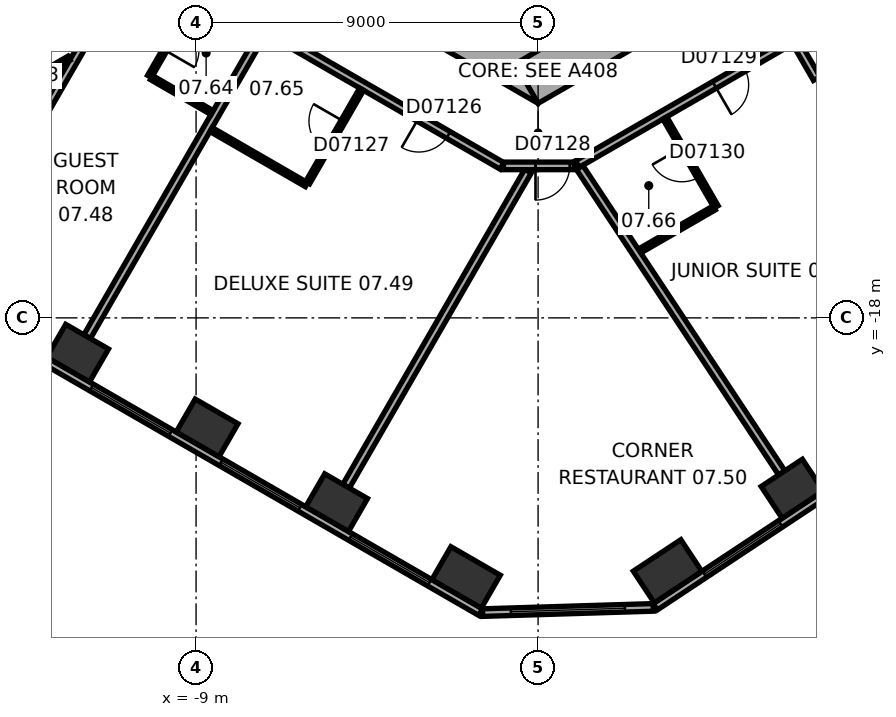
"""IFC4 building model, lengths in metres.
Left out: names, types, materials, properties, quantities, classifications, styles, units other than length and angle.
Written with IfcOpenShell. Run it as: python <this file> out.ifc"""

import sys

from ifc_helpers import new_model, si_unit, direction, frame, frame_2d, origin, origin_2d, place, context, subcontext, project, spatial, rectangle, extrude, element, fill, save


model = new_model("IFC4")
c1 = context("Model", 3, precision=1e-05, world=origin(), true_north=direction((0.0, 1.0)))
c2 = subcontext(c1, "Body", "Model", "MODEL_VIEW")
j1 = project(units=[si_unit("LENGTHUNIT", "METRE"), si_unit("PLANEANGLEUNIT", "RADIAN")], contexts=[c1])
p1 = place(None, origin())
s1 = spatial("IfcSite", under=j1, at=p1, CompositionType="ELEMENT")
p2 = place(p1, origin())
s2 = spatial("IfcBuilding", under=s1, at=p2, CompositionType="ELEMENT")
p3 = place(p2, frame((0.0, 0.0, 44.0)))
s3 = spatial("IfcBuildingStorey", under=s2, at=p3, CompositionType="ELEMENT", Elevation=44.0)
for number, where, z_axis, x_axis in (
    (1, (-12.117, -18.927, 0.0), (0.0, 0.0, 1.0), (0.866, -0.5, 0.0)),
    (2, (-8.71, -20.895, 0.0), (0.0, 0.0, 1.0), (0.866, -0.5, 0.0)),
    (3, (-5.302, -22.862, 0.0), (0.0, 0.0, 1.0), (0.866, -0.5, 0.0)),
):
    element("IfcColumn", number, at=place(p3, frame(where, z_axis=z_axis, x_axis=x_axis)), inside=s3, PredefinedType="COLUMN", context=c2, shape_type="SweptSolid", body=[
        extrude(rectangle(XDim=1.3, YDim=1.0, at=origin_2d()), origin(), (0.0, 0.0, 1.0), 3.3),
    ])
for number, where, z_axis, x_axis in (
    (4, (-1.895, -24.829, 0.0), (0.0, 0.0, 1.0), (0.866, -0.5, 0.0)),
    (5, (3.407, -24.667, 0.0), (0.0, 0.0, 1.0), (0.834, 0.552, 0.0)),
):
    element("IfcColumn", number, at=place(p3, frame(where, z_axis=z_axis, x_axis=x_axis)), inside=s3, PredefinedType="COLUMN", context=c2, shape_type="SweptSolid", body=[
        extrude(rectangle(XDim=1.5, YDim=1.0, at=origin_2d()), origin(), (0.0, 0.0, 1.0), 3.3),
    ])
p4 = place(p3, frame((6.688, -22.496, 0.0), z_axis=(0.0, 0.0, 1.0), x_axis=(0.833885822067, 0.551936985312, 0.0)))
e6 = element("IfcColumn", 6, at=p4, inside=s3, PredefinedType="COLUMN", context=c2, shape_type="SweptSolid", body=[
    extrude(rectangle(XDim=1.3, YDim=1.0, at=origin_2d()), origin(), (0.0, 0.0, 1.0), 3.3),
])
p5 = place(p3, frame((-10.4, -5.658, 0.0), z_axis=(0.0, 0.0, 1.0), x_axis=(0.866021384402, -0.500006961711, 0.0)))
e7 = element("IfcWall", 7, at=p5, inside=s3, PredefinedType="SHEAR", context=c2, shape_type="SweptSolid", body=[
    extrude(rectangle(XDim=12.355, YDim=1.2, at=frame_2d((6.178, 0.0))), origin(), (0.0, 0.0, 1.0), 3.3),
])
p6 = place(p5, frame((6.378, 0.0, 0.0)))
e8 = element("IfcOpeningElement", 8, at=p6, cuts=e7, PredefinedType="OPENING", context=c2, shape_type="SweptSolid", body=[
    extrude(rectangle(XDim=1.5, YDim=2.1, at=frame_2d((0.75, 1.05))), frame((0.0, 0.61, 0.0), z_axis=(0.0, -1.0, 0.0), x_axis=(1.0, 0.0, 0.0)), (0.0, 0.0, 1.0), 1.22),
])
p7 = place(p5, frame((3.228, 0.0, 0.0)))
e9 = element("IfcOpeningElement", 9, at=p7, cuts=e7, PredefinedType="OPENING", context=c2, shape_type="SweptSolid", body=[
    extrude(rectangle(XDim=0.9, YDim=2.1, at=frame_2d((0.45, 1.05))), frame((0.0, 0.61, 0.0), z_axis=(0.0, -1.0, 0.0), x_axis=(1.0, 0.0, 0.0)), (0.0, 0.0, 1.0), 1.22),
])
p8 = place(p3, frame((-0.3, -11.836, 0.0), z_axis=(0.0, 0.0, 1.0), x_axis=(0.866021384402, 0.500006961711, 0.0)))
e10 = element("IfcWall", 10, at=p8, inside=s3, PredefinedType="SHEAR", context=c2, shape_type="SweptSolid", body=[
    extrude(rectangle(XDim=12.355, YDim=1.2, at=frame_2d((6.178, 0.0))), origin(), (0.0, 0.0, 1.0), 3.3),
])
p9 = place(p8, frame((2.828, 0.0, 0.0)))
e11 = element("IfcOpeningElement", 11, at=p9, cuts=e10, PredefinedType="OPENING", context=c2, shape_type="SweptSolid", body=[
    extrude(rectangle(XDim=0.9, YDim=2.1, at=frame_2d((0.45, 1.05))), frame((0.0, 0.61, 0.0), z_axis=(0.0, -1.0, 0.0), x_axis=(1.0, 0.0, 0.0)), (0.0, 0.0, 1.0), 1.22),
])
p10 = place(p8, frame((5.428, 0.0, 0.0)))
e12 = element("IfcOpeningElement", 12, at=p10, cuts=e10, PredefinedType="OPENING", context=c2, shape_type="SweptSolid", body=[
    extrude(rectangle(XDim=0.9, YDim=2.1, at=frame_2d((0.45, 1.05))), frame((0.0, 0.61, 0.0), z_axis=(0.0, -1.0, 0.0), x_axis=(1.0, 0.0, 0.0)), (0.0, 0.0, 1.0), 1.22),
])
p11 = place(p8, frame((7.928, 0.0, 0.0)))
e13 = element("IfcOpeningElement", 13, at=p11, cuts=e10, PredefinedType="OPENING", context=c2, shape_type="SweptSolid", body=[
    extrude(rectangle(XDim=1.1, YDim=2.1, at=frame_2d((0.55, 1.05))), frame((0.0, 0.61, 0.0), z_axis=(0.0, -1.0, 0.0), x_axis=(1.0, 0.0, 0.0)), (0.0, 0.0, 1.0), 1.22),
])
p12 = place(p3, frame((-19.914, -15.119, 0.0), z_axis=(0.0, 0.0, 1.0), x_axis=(0.866025418898, -0.499999973822, 0.0)))
e14 = element("IfcWall", 14, at=p12, inside=s3, PredefinedType="STANDARD", context=c2, shape_type="SweptSolid", body=[
    extrude(rectangle(XDim=21.246, YDim=0.2, at=frame_2d((10.623, 0.0))), origin(), (0.0, 0.0, 1.0), 3.3),
])
p13 = place(p12, frame((1.555, 0.0, 0.8)))
e15 = element("IfcOpeningElement", 15, at=p13, cuts=e14, PredefinedType="OPENING", context=c2, shape_type="SweptSolid", body=[
    extrude(rectangle(XDim=2.4, YDim=1.7, at=frame_2d((1.2, 0.85))), frame((0.0, 0.11, 0.0), z_axis=(0.0, -1.0, 0.0), x_axis=(1.0, 0.0, 0.0)), (0.0, 0.0, 1.0), 0.22),
])
p14 = place(p12, frame((5.489, 0.0, 0.8)))
e16 = element("IfcOpeningElement", 16, at=p14, cuts=e14, PredefinedType="OPENING", context=c2, shape_type="SweptSolid", body=[
    extrude(rectangle(XDim=2.4, YDim=1.7, at=frame_2d((1.2, 0.85))), frame((0.0, 0.11, 0.0), z_axis=(0.0, -1.0, 0.0), x_axis=(1.0, 0.0, 0.0)), (0.0, 0.0, 1.0), 0.22),
])
p15 = place(p12, frame((9.424, 0.0, 0.8)))
e17 = element("IfcOpeningElement", 17, at=p15, cuts=e14, PredefinedType="OPENING", context=c2, shape_type="SweptSolid", body=[
    extrude(rectangle(XDim=2.4, YDim=1.7, at=frame_2d((1.2, 0.85))), frame((0.0, 0.11, 0.0), z_axis=(0.0, -1.0, 0.0), x_axis=(1.0, 0.0, 0.0)), (0.0, 0.0, 1.0), 0.22),
])
p16 = place(p12, frame((13.358, 0.0, 0.8)))
e18 = element("IfcOpeningElement", 18, at=p16, cuts=e14, PredefinedType="OPENING", context=c2, shape_type="SweptSolid", body=[
    extrude(rectangle(XDim=2.4, YDim=1.7, at=frame_2d((1.2, 0.85))), frame((0.0, 0.11, 0.0), z_axis=(0.0, -1.0, 0.0), x_axis=(1.0, 0.0, 0.0)), (0.0, 0.0, 1.0), 0.22),
])
p17 = place(p12, frame((17.293, 0.0, 0.8)))
e19 = element("IfcOpeningElement", 19, at=p17, cuts=e14, PredefinedType="OPENING", context=c2, shape_type="SweptSolid", body=[
    extrude(rectangle(XDim=2.4, YDim=1.7, at=frame_2d((1.2, 0.85))), frame((0.0, 0.11, 0.0), z_axis=(0.0, -1.0, 0.0), x_axis=(1.0, 0.0, 0.0)), (0.0, 0.0, 1.0), 0.22),
])
p18 = place(p3, frame((-1.461, -25.755, 0.0), z_axis=(0.0, 0.0, 1.0), x_axis=(0.999533823446, 0.030530898895, 0.0)))
e20 = element("IfcWall", 20, at=p18, inside=s3, PredefinedType="STANDARD", context=c2, shape_type="SweptSolid", body=[
    extrude(rectangle(XDim=4.494, YDim=0.2, at=frame_2d((2.247, 0.0))), origin(), (0.0, 0.0, 1.0), 3.3),
])
p19 = place(p18, frame((0.747, 0.0, 0.8)))
e21 = element("IfcOpeningElement", 21, at=p19, cuts=e20, PredefinedType="OPENING", context=c2, shape_type="SweptSolid", body=[
    extrude(rectangle(XDim=3.0, YDim=1.7, at=frame_2d((1.5, 0.85))), frame((0.0, 0.11, 0.0), z_axis=(0.0, -1.0, 0.0), x_axis=(1.0, 0.0, 0.0)), (0.0, 0.0, 1.0), 0.22),
])
p20 = place(p3, frame((3.083, -25.601, 0.0), z_axis=(0.0, 0.0, 1.0), x_axis=(0.833884295743, 0.551939291329, 0.0)))
e22 = element("IfcWall", 22, at=p20, inside=s3, PredefinedType="STANDARD", context=c2, shape_type="SweptSolid", body=[
    extrude(rectangle(XDim=21.246, YDim=0.2, at=frame_2d((10.623, 0.0))), origin(), (0.0, 0.0, 1.0), 3.3),
])
p21 = place(p20, frame((1.553, 0.0, 0.8)))
e23 = element("IfcOpeningElement", 23, at=p21, cuts=e22, PredefinedType="OPENING", context=c2, shape_type="SweptSolid", body=[
    extrude(rectangle(XDim=2.4, YDim=1.7, at=frame_2d((1.2, 0.85))), frame((0.0, 0.11, 0.0), z_axis=(0.0, -1.0, 0.0), x_axis=(1.0, 0.0, 0.0)), (0.0, 0.0, 1.0), 0.22),
])
p22 = place(p20, frame((5.488, 0.0, 0.8)))
e24 = element("IfcOpeningElement", 24, at=p22, cuts=e22, PredefinedType="OPENING", context=c2, shape_type="SweptSolid", body=[
    extrude(rectangle(XDim=2.4, YDim=1.7, at=frame_2d((1.2, 0.85))), frame((0.0, 0.11, 0.0), z_axis=(0.0, -1.0, 0.0), x_axis=(1.0, 0.0, 0.0)), (0.0, 0.0, 1.0), 0.22),
])
p23 = place(p20, frame((9.422, 0.0, 0.8)))
e25 = element("IfcOpeningElement", 25, at=p23, cuts=e22, PredefinedType="OPENING", context=c2, shape_type="SweptSolid", body=[
    extrude(rectangle(XDim=2.4, YDim=1.7, at=frame_2d((1.2, 0.85))), frame((0.0, 0.11, 0.0), z_axis=(0.0, -1.0, 0.0), x_axis=(1.0, 0.0, 0.0)), (0.0, 0.0, 1.0), 0.22),
])
p24 = place(p20, frame((13.357, 0.0, 0.8)))
e26 = element("IfcOpeningElement", 26, at=p24, cuts=e22, PredefinedType="OPENING", context=c2, shape_type="SweptSolid", body=[
    extrude(rectangle(XDim=2.4, YDim=1.7, at=frame_2d((1.2, 0.85))), frame((0.0, 0.11, 0.0), z_axis=(0.0, -1.0, 0.0), x_axis=(1.0, 0.0, 0.0)), (0.0, 0.0, 1.0), 0.22),
])
p25 = place(p20, frame((17.291, 0.0, 0.8)))
e27 = element("IfcOpeningElement", 27, at=p25, cuts=e22, PredefinedType="OPENING", context=c2, shape_type="SweptSolid", body=[
    extrude(rectangle(XDim=2.4, YDim=1.7, at=frame_2d((1.2, 0.85))), frame((0.0, 0.11, 0.0), z_axis=(0.0, -1.0, 0.0), x_axis=(1.0, 0.0, 0.0)), (0.0, 0.0, 1.0), 0.22),
])
p26 = place(p3, frame((-15.274, -16.527, 0.0), z_axis=(0.0, 0.0, 1.0), x_axis=(0.49998823431, 0.866032196602, 0.0)))
e28 = element("IfcWall", 28, at=p26, inside=s3, PredefinedType="PARTITIONING", context=c2, shape_type="SweptSolid", body=[
    extrude(rectangle(XDim=9.25, YDim=0.2, at=frame_2d((4.625, 0.0))), origin(), (0.0, 0.0, 1.0), 3.05),
])
p27 = place(p3, frame((-12.342, -11.167, 0.0), z_axis=(0.0, 0.0, 1.0), x_axis=(-0.865992557167, -0.500056887695, 0.0)))
e29 = element("IfcWall", 29, at=p27, inside=s3, PredefinedType="PARTITIONING", context=c2, shape_type="SweptSolid", body=[
    extrude(rectangle(XDim=1.769, YDim=0.12, at=frame_2d((0.885, 0.0))), origin(), (0.0, 0.0, 1.0), 3.05),
])
p28 = place(p3, frame((-11.867, -18.494, 0.0), z_axis=(0.0, 0.0, 1.0), x_axis=(0.499999662836, 0.866025598446, 0.0)))
e30 = element("IfcWall", 30, at=p28, inside=s3, PredefinedType="PARTITIONING", context=c2, shape_type="SweptSolid", body=[
    extrude(rectangle(XDim=9.25, YDim=0.2, at=frame_2d((4.625, 0.0))), origin(), (0.0, 0.0, 1.0), 2.6),
])
p29 = place(p3, frame((-11.615, -7.843, 0.0), z_axis=(0.0, 0.0, 1.0), x_axis=(0.866026466995, -0.499998158461, 0.0)))
e31 = element("IfcWall", 31, at=p29, inside=s3, PredefinedType="PARTITIONING", context=c2, shape_type="SweptSolid", body=[
    extrude(rectangle(XDim=12.315, YDim=0.2, at=frame_2d((6.158, 0.0))), origin(), (0.0, 0.0, 1.0), 3.05),
])
p30 = place(p29, frame((1.665, 0.0, 0.0)))
e32 = element("IfcOpeningElement", 32, at=p30, cuts=e31, PredefinedType="OPENING", context=c2, shape_type="SweptSolid", body=[
    extrude(rectangle(XDim=0.9, YDim=2.1, at=frame_2d((0.45, 1.05))), frame((0.0, 0.11, 0.0), z_axis=(0.0, -1.0, 0.0), x_axis=(1.0, 0.0, 0.0)), (0.0, 0.0, 1.0), 0.22),
])
p31 = place(p29, frame((9.787, 0.0, 0.0)))
e33 = element("IfcOpeningElement", 33, at=p31, cuts=e31, PredefinedType="OPENING", context=c2, shape_type="SweptSolid", body=[
    extrude(rectangle(XDim=0.9, YDim=2.1, at=frame_2d((0.45, 1.05))), frame((0.0, 0.11, 0.0), z_axis=(0.0, -1.0, 0.0), x_axis=(1.0, 0.0, 0.0)), (0.0, 0.0, 1.0), 0.22),
])
p32 = place(p3, frame((-10.224, -11.648, 0.0), z_axis=(0.0, 0.0, 1.0), x_axis=(0.500004234368, 0.866022959057, 0.0)))
e34 = element("IfcWall", 34, at=p32, inside=s3, PredefinedType="PARTITIONING", context=c2, shape_type="SweptSolid", body=[
    extrude(rectangle(XDim=2.5, YDim=0.12, at=frame_2d((1.25, 0.0))), origin(), (0.0, 0.0, 1.0), 3.05),
])
p33 = place(p32, frame((0.8, 0.0, 0.0)))
e35 = element("IfcOpeningElement", 35, at=p33, cuts=e34, PredefinedType="OPENING", context=c2, shape_type="SweptSolid", body=[
    extrude(rectangle(XDim=0.9, YDim=2.1, at=frame_2d((0.45, 1.05))), frame((0.0, 0.07, 0.0), z_axis=(0.0, -1.0, 0.0), x_axis=(1.0, 0.0, 0.0)), (0.0, 0.0, 1.0), 0.14),
])
p34 = place(p3, frame((-8.579, -12.598, 0.0), z_axis=(0.0, 0.0, 1.0), x_axis=(-0.866046386007, 0.499963655964, 0.0)))
e36 = element("IfcWall", 36, at=p34, inside=s3, PredefinedType="PARTITIONING", context=c2, shape_type="SweptSolid", body=[
    extrude(rectangle(XDim=1.84, YDim=0.12, at=frame_2d((0.92, 0.0))), origin(), (0.0, 0.0, 1.0), 3.05),
])
p35 = place(p3, frame((-6.094, -14.495, 0.0), z_axis=(0.0, 0.0, 1.0), x_axis=(-0.866032775405, 0.499987231761, 0.0)))
e37 = element("IfcWall", 37, at=p35, inside=s3, PredefinedType="PARTITIONING", context=c2, shape_type="SweptSolid", body=[
    extrude(rectangle(XDim=2.9, YDim=0.12, at=frame_2d((1.45, 0.0))), origin(), (0.0, 0.0, 1.0), 3.05),
])
p36 = place(p3, frame((-5.052, -22.429, 0.0), z_axis=(0.0, 0.0, 1.0), x_axis=(0.500004329283, 0.866022904257, 0.0)))
e38 = element("IfcWall", 38, at=p36, inside=s3, PredefinedType="PARTITIONING", context=c2, shape_type="SweptSolid", body=[
    extrude(rectangle(XDim=9.572, YDim=0.2, at=frame_2d((4.786, 0.0))), origin(), (0.0, 0.0, 1.0), 3.05),
])
p37 = place(p3, frame((-4.644, -11.983, 0.0), z_axis=(0.0, 0.0, 1.0), x_axis=(-0.499985389037, -0.866033839264, 0.0)))
e39 = element("IfcWall", 39, at=p37, inside=s3, PredefinedType="PARTITIONING", context=c2, shape_type="SweptSolid", body=[
    extrude(rectangle(XDim=2.84, YDim=0.12, at=frame_2d((1.42, 0.0))), origin(), (0.0, 0.0, 1.0), 3.05),
])
p38 = place(p37, frame((0.97, 0.0, 0.0)))
e40 = element("IfcOpeningElement", 40, at=p38, cuts=e39, PredefinedType="OPENING", context=c2, shape_type="SweptSolid", body=[
    extrude(rectangle(XDim=0.9, YDim=2.1, at=frame_2d((0.45, 1.05))), frame((0.0, 0.07, 0.0), z_axis=(0.0, -1.0, 0.0), x_axis=(1.0, 0.0, 0.0)), (0.0, 0.0, 1.0), 0.14),
])
p39 = place(p3, frame((-0.91, -14.001, 0.0), z_axis=(0.0, 0.0, 1.0), x_axis=(1.0, 0.0, 0.0)))
e41 = element("IfcWall", 41, at=p39, inside=s3, PredefinedType="PARTITIONING", context=c2, shape_type="SweptSolid", body=[
    extrude(rectangle(XDim=1.86, YDim=0.2, at=frame_2d((0.93, 0.0))), origin(), (0.0, 0.0, 1.0), 3.05),
])
p40 = place(p39, frame((0.842, 0.0, 0.0)))
e42 = element("IfcOpeningElement", 42, at=p40, cuts=e41, PredefinedType="OPENING", context=c2, shape_type="SweptSolid", body=[
    extrude(rectangle(XDim=0.9, YDim=2.1, at=frame_2d((0.45, 1.05))), frame((0.0, 0.11, 0.0), z_axis=(0.0, -1.0, 0.0), x_axis=(1.0, 0.0, 0.0)), (0.0, 0.0, 1.0), 0.22),
])
p41 = place(p3, frame((1.033, -13.953, 0.0), z_axis=(0.0, 0.0, 1.0), x_axis=(0.866017531406, 0.500013635111, 0.0)))
e43 = element("IfcWall", 43, at=p41, inside=s3, PredefinedType="PARTITIONING", context=c2, shape_type="SweptSolid", body=[
    extrude(rectangle(XDim=6.58, YDim=0.2, at=frame_2d((3.29, 0.0))), origin(), (0.0, 0.0, 1.0), 3.05),
])
p42 = place(p41, frame((4.165, 0.0, 0.0)))
e44 = element("IfcOpeningElement", 44, at=p42, cuts=e43, PredefinedType="OPENING", context=c2, shape_type="SweptSolid", body=[
    extrude(rectangle(XDim=0.9, YDim=2.1, at=frame_2d((0.45, 1.05))), frame((0.0, 0.11, 0.0), z_axis=(0.0, -1.0, 0.0), x_axis=(1.0, 0.0, 0.0)), (0.0, 0.0, 1.0), 0.22),
])
p43 = place(p3, frame((3.335, -12.739, 0.0), z_axis=(0.0, 0.0, 1.0), x_axis=(0.499980770555, -0.866036505625, 0.0)))
e45 = element("IfcWall", 45, at=p43, inside=s3, PredefinedType="PARTITIONING", context=c2, shape_type="SweptSolid", body=[
    extrude(rectangle(XDim=2.7, YDim=0.12, at=frame_2d((1.35, 0.0))), origin(), (0.0, 0.0, 1.0), 3.05),
])
p44 = place(p43, frame((0.9, 0.0, 0.0)))
e46 = element("IfcOpeningElement", 46, at=p44, cuts=e45, PredefinedType="OPENING", context=c2, shape_type="SweptSolid", body=[
    extrude(rectangle(XDim=0.9, YDim=2.1, at=frame_2d((0.45, 1.05))), frame((0.0, 0.07, 0.0), z_axis=(0.0, -1.0, 0.0), x_axis=(1.0, 0.0, 0.0)), (0.0, 0.0, 1.0), 0.14),
])
p45 = place(p3, frame((4.633, -15.107, 0.0), z_axis=(0.0, 0.0, 1.0), x_axis=(-0.866022496617, -0.500005035328, 0.0)))
e47 = element("IfcWall", 47, at=p45, inside=s3, PredefinedType="PARTITIONING", context=c2, shape_type="SweptSolid", body=[
    extrude(rectangle(XDim=2.269, YDim=0.12, at=frame_2d((1.134, 0.0))), origin(), (0.0, 0.0, 1.0), 3.05),
])
p46 = place(p3, frame((6.412, -22.079, 0.0), z_axis=(0.0, 0.0, 1.0), x_axis=(-0.551919507115, 0.83389739037, 0.0)))
e48 = element("IfcWall", 48, at=p46, inside=s3, PredefinedType="PARTITIONING", context=c2, shape_type="SweptSolid", body=[
    extrude(rectangle(XDim=9.635, YDim=0.2, at=frame_2d((4.817, 0.0))), origin(), (0.0, 0.0, 1.0), 3.05),
])
p47 = place(p3, frame((6.782, -10.749, 0.0), z_axis=(0.0, 0.0, 1.0), x_axis=(0.500074377092, -0.865982457891, 0.0)))
e49 = element("IfcWall", 49, at=p47, inside=s3, PredefinedType="PARTITIONING", context=c2, shape_type="SweptSolid", body=[
    extrude(rectangle(XDim=1.101, YDim=0.2, at=frame_2d((0.55, 0.0))), origin(), (0.0, 0.0, 1.0), 3.05),
])
p48 = place(p15, origin())
e50 = element("IfcWindow", 50, at=p48, inside=s3, PartitioningType="SINGLE_PANEL", PredefinedType="WINDOW", context=c2, shape_type="SweptSolid", body=[
    extrude(rectangle(XDim=2.4, YDim=1.7, at=frame_2d((1.2, 0.85))), frame((0.0, 0.03, 0.0), z_axis=(0.0, -1.0, 0.0), x_axis=(1.0, 0.0, 0.0)), (0.0, 0.0, 1.0), 0.06),
])
fill(e17, e50)
p49 = place(p16, origin())
e51 = element("IfcWindow", 51, at=p49, inside=s3, PartitioningType="SINGLE_PANEL", PredefinedType="WINDOW", context=c2, shape_type="SweptSolid", body=[
    extrude(rectangle(XDim=2.4, YDim=1.7, at=frame_2d((1.2, 0.85))), frame((0.0, 0.03, 0.0), z_axis=(0.0, -1.0, 0.0), x_axis=(1.0, 0.0, 0.0)), (0.0, 0.0, 1.0), 0.06),
])
fill(e18, e51)
p50 = place(p17, origin())
e52 = element("IfcWindow", 52, at=p50, inside=s3, PartitioningType="SINGLE_PANEL", PredefinedType="WINDOW", context=c2, shape_type="SweptSolid", body=[
    extrude(rectangle(XDim=2.4, YDim=1.7, at=frame_2d((1.2, 0.85))), frame((0.0, 0.03, 0.0), z_axis=(0.0, -1.0, 0.0), x_axis=(1.0, 0.0, 0.0)), (0.0, 0.0, 1.0), 0.06),
])
fill(e19, e52)
p51 = place(p19, origin())
e53 = element("IfcWindow", 53, at=p51, inside=s3, PartitioningType="SINGLE_PANEL", PredefinedType="WINDOW", context=c2, shape_type="SweptSolid", body=[
    extrude(rectangle(XDim=3.0, YDim=1.7, at=frame_2d((1.5, 0.85))), frame((0.0, 0.03, 0.0), z_axis=(0.0, -1.0, 0.0), x_axis=(1.0, 0.0, 0.0)), (0.0, 0.0, 1.0), 0.06),
])
fill(e21, e53)
p52 = place(p21, origin())
e54 = element("IfcWindow", 54, at=p52, inside=s3, PartitioningType="SINGLE_PANEL", PredefinedType="WINDOW", context=c2, shape_type="SweptSolid", body=[
    extrude(rectangle(XDim=2.4, YDim=1.7, at=frame_2d((1.2, 0.85))), frame((0.0, 0.03, 0.0), z_axis=(0.0, -1.0, 0.0), x_axis=(1.0, 0.0, 0.0)), (0.0, 0.0, 1.0), 0.06),
])
fill(e23, e54)
p53 = place(p31, origin())
e55 = element("IfcDoor", 55, at=p53, inside=s3, OperationType="SINGLE_SWING_LEFT", PredefinedType="DOOR", context=c2, shape_type="SweptSolid", body=[
    extrude(rectangle(XDim=0.9, YDim=2.1, at=frame_2d((0.45, 1.05))), frame((0.0, 0.025, 0.0), z_axis=(0.0, -1.0, 0.0), x_axis=(1.0, 0.0, 0.0)), (0.0, 0.0, 1.0), 0.05),
])
fill(e33, e55)
p54 = place(p38, origin())
e56 = element("IfcDoor", 56, at=p54, inside=s3, OperationType="SINGLE_SWING_LEFT", PredefinedType="DOOR", context=c2, shape_type="SweptSolid", body=[
    extrude(rectangle(XDim=0.9, YDim=2.1, at=frame_2d((0.45, 1.05))), frame((0.0, 0.025, 0.0), z_axis=(0.0, -1.0, 0.0), x_axis=(1.0, 0.0, 0.0)), (0.0, 0.0, 1.0), 0.05),
])
fill(e40, e56)
p55 = place(p40, origin())
e57 = element("IfcDoor", 57, at=p55, inside=s3, OperationType="SINGLE_SWING_LEFT", PredefinedType="DOOR", context=c2, shape_type="SweptSolid", body=[
    extrude(rectangle(XDim=0.9, YDim=2.1, at=frame_2d((0.45, 1.05))), frame((0.0, 0.025, 0.0), z_axis=(0.0, -1.0, 0.0), x_axis=(1.0, 0.0, 0.0)), (0.0, 0.0, 1.0), 0.05),
])
fill(e42, e57)
p56 = place(p42, origin())
e58 = element("IfcDoor", 58, at=p56, inside=s3, OperationType="SINGLE_SWING_LEFT", PredefinedType="DOOR", context=c2, shape_type="SweptSolid", body=[
    extrude(rectangle(XDim=0.9, YDim=2.1, at=frame_2d((0.45, 1.05))), frame((0.0, 0.025, 0.0), z_axis=(0.0, -1.0, 0.0), x_axis=(1.0, 0.0, 0.0)), (0.0, 0.0, 1.0), 0.05),
])
fill(e44, e58)
p57 = place(p44, origin())
e59 = element("IfcDoor", 59, at=p57, inside=s3, OperationType="SINGLE_SWING_LEFT", PredefinedType="DOOR", context=c2, shape_type="SweptSolid", body=[
    extrude(rectangle(XDim=0.9, YDim=2.1, at=frame_2d((0.45, 1.05))), frame((0.0, 0.025, 0.0), z_axis=(0.0, -1.0, 0.0), x_axis=(1.0, 0.0, 0.0)), (0.0, 0.0, 1.0), 0.05),
])
fill(e46, e59)
save(model, sys.argv[1])
